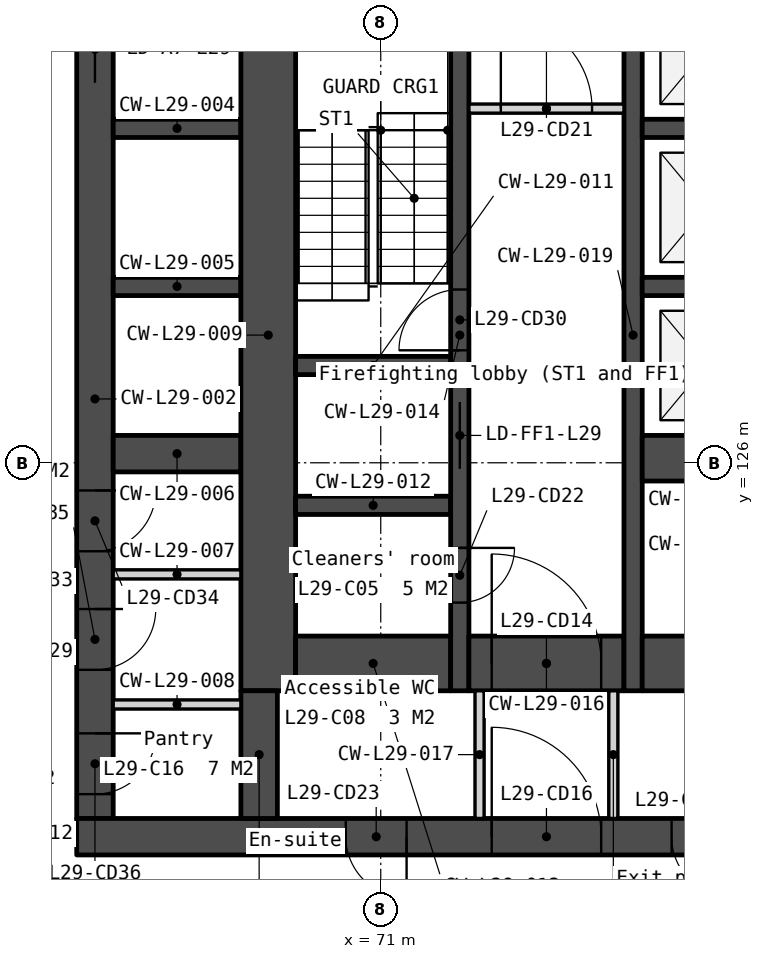
"""IFC4 building model, lengths in metres.
Left out: names, types, materials, properties, quantities, classifications, styles, units other than length and angle.
Written with IfcOpenShell. Run it as: python <this file> out.ifc"""

import sys

from ifc_helpers import new_model, si_unit, direction, frame, frame_2d, origin, place, context, subcontext, project, spatial, polyline, rectangle, outline, extrude, element, fill, save


model = new_model("IFC4")
c1 = context("Model", 3, precision=1e-05, world=origin(), true_north=direction((0.0, 1.0)))
c2 = subcontext(c1, "Body", "Model", "MODEL_VIEW")
j1 = project(units=[si_unit("LENGTHUNIT", "METRE"), si_unit("PLANEANGLEUNIT", "RADIAN")], contexts=[c1])
p1 = place(None, origin())
s1 = spatial("IfcSite", under=j1, at=p1, CompositionType="ELEMENT")
p2 = place(p1, origin())
s2 = spatial("IfcBuilding", under=s1, at=p2, CompositionType="ELEMENT")
p3 = place(p2, frame((0.0, 0.0, 116.8)))
s3 = spatial("IfcBuildingStorey", under=s2, at=p3, CompositionType="ELEMENT", Elevation=116.8)
p4 = place(p3, frame((66.3, 133.95, 0.0), z_axis=(0.0, 0.0, 1.0), x_axis=(0.0, -1.0, 0.0)))
e1 = element("IfcWall", 1, at=p4, inside=s3, PredefinedType="SOLIDWALL", context=c2, shape_type="SweptSolid", body=[
    extrude(rectangle(XDim=13.8, YDim=0.6, at=frame_2d((6.9, 0.0))), origin(), (0.0, 0.0, 1.0), 3.35),
])
p5 = place(p4, frame((0.6, 0.0, 0.0)))
e2 = element("IfcOpeningElement", 2, at=p5, cuts=e1, PredefinedType="OPENING", context=c2, shape_type="SweptSolid", body=[
    extrude(rectangle(XDim=1.1, YDim=2.1, at=frame_2d((0.55, 1.05))), frame((0.0, 0.31, 0.0), z_axis=(0.0, -1.0, 0.0), x_axis=(1.0, 0.0, 0.0)), (0.0, 0.0, 1.0), 0.62),
])
p6 = place(p4, frame((8.405, 0.0, 0.0)))
e3 = element("IfcOpeningElement", 3, at=p6, cuts=e1, PredefinedType="OPENING", context=c2, shape_type="SweptSolid", body=[
    extrude(rectangle(XDim=1.0, YDim=2.1, at=frame_2d((0.5, 1.05))), frame((0.0, 0.31, 0.0), z_axis=(0.0, -1.0, 0.0), x_axis=(1.0, 0.0, 0.0)), (0.0, 0.0, 1.0), 0.62),
])
p7 = place(p4, frame((10.355, 0.0, 0.0)))
e4 = element("IfcOpeningElement", 4, at=p7, cuts=e1, PredefinedType="OPENING", context=c2, shape_type="SweptSolid", body=[
    extrude(rectangle(XDim=1.0, YDim=2.1, at=frame_2d((0.5, 1.05))), frame((0.0, 0.31, 0.0), z_axis=(0.0, -1.0, 0.0), x_axis=(1.0, 0.0, 0.0)), (0.0, 0.0, 1.0), 0.62),
])
p8 = place(p4, frame((12.4, 0.0, 0.0)))
e5 = element("IfcOpeningElement", 5, at=p8, cuts=e1, PredefinedType="OPENING", context=c2, shape_type="SweptSolid", body=[
    extrude(rectangle(XDim=1.0, YDim=2.1, at=frame_2d((0.5, 1.05))), frame((0.0, 0.31, 0.0), z_axis=(0.0, -1.0, 0.0), x_axis=(1.0, 0.0, 0.0)), (0.0, 0.0, 1.0), 0.62),
])
p9 = place(p3, frame((66.0, 119.85, 0.0), z_axis=(0.0, 0.0, 1.0), x_axis=(1.0, 0.0, 0.0)))
e6 = element("IfcWall", 6, at=p9, inside=s3, PredefinedType="SOLIDWALL", context=c2, shape_type="SweptSolid", body=[
    extrude(rectangle(XDim=28.0, YDim=0.6, at=frame_2d((14.0, 0.0))), origin(), (0.0, 0.0, 1.0), 3.35),
])
p10 = place(p9, frame((6.825, 0.0, 0.0)))
e7 = element("IfcOpeningElement", 7, at=p10, cuts=e6, PredefinedType="OPENING", context=c2, shape_type="SweptSolid", body=[
    extrude(rectangle(XDim=1.8, YDim=2.1, at=frame_2d((0.9, 1.05))), frame((0.0, 0.31, 0.0), z_axis=(0.0, -1.0, 0.0), x_axis=(1.0, 0.0, 0.0)), (0.0, 0.0, 1.0), 0.62),
])
p11 = place(p9, frame((15.85, 0.0, 0.0)))
e8 = element("IfcOpeningElement", 8, at=p11, cuts=e6, PredefinedType="OPENING", context=c2, shape_type="SweptSolid", body=[
    extrude(rectangle(XDim=1.5, YDim=2.1, at=frame_2d((0.75, 1.05))), frame((0.0, 0.31, 0.0), z_axis=(0.0, -1.0, 0.0), x_axis=(1.0, 0.0, 0.0)), (0.0, 0.0, 1.0), 0.62),
])
p12 = place(p9, frame((19.375, 0.0, 0.0)))
e9 = element("IfcOpeningElement", 9, at=p12, cuts=e6, PredefinedType="OPENING", context=c2, shape_type="SweptSolid", body=[
    extrude(rectangle(XDim=1.8, YDim=2.1, at=frame_2d((0.9, 1.05))), frame((0.0, 0.31, 0.0), z_axis=(0.0, -1.0, 0.0), x_axis=(1.0, 0.0, 0.0)), (0.0, 0.0, 1.0), 0.62),
])
p13 = place(p9, frame((4.425, 0.0, 0.0)))
e10 = element("IfcOpeningElement", 10, at=p13, cuts=e6, PredefinedType="OPENING", context=c2, shape_type="SweptSolid", body=[
    extrude(rectangle(XDim=1.0, YDim=2.1, at=frame_2d((0.5, 1.05))), frame((0.0, 0.31, 0.0), z_axis=(0.0, -1.0, 0.0), x_axis=(1.0, 0.0, 0.0)), (0.0, 0.0, 1.0), 0.62),
])
p14 = place(p9, frame((9.783, 0.0, 0.0)))
e11 = element("IfcOpeningElement", 11, at=p14, cuts=e6, PredefinedType="OPENING", context=c2, shape_type="SweptSolid", body=[
    extrude(rectangle(XDim=1.0, YDim=2.1, at=frame_2d((0.5, 1.05))), frame((0.0, 0.31, 0.0), z_axis=(0.0, -1.0, 0.0), x_axis=(1.0, 0.0, 0.0)), (0.0, 0.0, 1.0), 0.62),
])
p15 = place(p9, frame((11.525, 0.0, 0.0)))
e12 = element("IfcOpeningElement", 12, at=p15, cuts=e6, PredefinedType="OPENING", context=c2, shape_type="SweptSolid", body=[
    extrude(rectangle(XDim=1.0, YDim=2.1, at=frame_2d((0.5, 1.05))), frame((0.0, 0.31, 0.0), z_axis=(0.0, -1.0, 0.0), x_axis=(1.0, 0.0, 0.0)), (0.0, 0.0, 1.0), 0.62),
])
p16 = place(p9, frame((13.658, 0.0, 0.0)))
e13 = element("IfcOpeningElement", 13, at=p16, cuts=e6, PredefinedType="OPENING", context=c2, shape_type="SweptSolid", body=[
    extrude(rectangle(XDim=1.0, YDim=2.1, at=frame_2d((0.5, 1.05))), frame((0.0, 0.31, 0.0), z_axis=(0.0, -1.0, 0.0), x_axis=(1.0, 0.0, 0.0)), (0.0, 0.0, 1.0), 0.62),
])
p17 = place(p9, frame((21.725, 0.0, 0.0)))
e14 = element("IfcOpeningElement", 14, at=p17, cuts=e6, PredefinedType="OPENING", context=c2, shape_type="SweptSolid", body=[
    extrude(rectangle(XDim=1.0, YDim=2.1, at=frame_2d((0.5, 1.05))), frame((0.0, 0.31, 0.0), z_axis=(0.0, -1.0, 0.0), x_axis=(1.0, 0.0, 0.0)), (0.0, 0.0, 1.0), 0.62),
])
p18 = place(p9, frame((23.425, 0.0, 0.0)))
e15 = element("IfcOpeningElement", 15, at=p18, cuts=e6, PredefinedType="OPENING", context=c2, shape_type="SweptSolid", body=[
    extrude(rectangle(XDim=1.0, YDim=2.1, at=frame_2d((0.5, 1.05))), frame((0.0, 0.31, 0.0), z_axis=(0.0, -1.0, 0.0), x_axis=(1.0, 0.0, 0.0)), (0.0, 0.0, 1.0), 0.62),
])
for number, where, z_axis, x_axis in (
    (16, (66.6, 131.5, 0.0), (0.0, 0.0, 1.0), (1.0, 0.0, 0.0)),
    (17, (66.6, 128.9, 0.0), (0.0, 0.0, 1.0), (1.0, 0.0, 0.0)),
):
    element("IfcWall", number, at=place(p3, frame(where, z_axis=z_axis, x_axis=x_axis)), inside=s3, PredefinedType="SOLIDWALL", context=c2, shape_type="SweptSolid", body=[
        extrude(rectangle(XDim=2.1, YDim=0.3, at=frame_2d((1.05, 0.0))), origin(), (0.0, 0.0, 1.0), 3.35),
    ])
p19 = place(p3, frame((66.6, 126.15, 0.0), z_axis=(0.0, 0.0, 1.0), x_axis=(1.0, 0.0, 0.0)))
e18 = element("IfcWall", 18, at=p19, inside=s3, PredefinedType="SOLIDWALL", context=c2, shape_type="SweptSolid", body=[
    extrude(rectangle(XDim=2.1, YDim=0.6, at=frame_2d((1.05, 0.0))), origin(), (0.0, 0.0, 1.0), 3.35),
])
for number, where, z_axis, x_axis in (
    (19, (66.6, 124.165, 0.0), (0.0, 0.0, 1.0), (1.0, 0.0, 0.0)),
    (20, (66.6, 122.025, 0.0), (0.0, 0.0, 1.0), (1.0, 0.0, 0.0)),
):
    element("IfcWall", number, at=place(p3, frame(where, z_axis=z_axis, x_axis=x_axis)), inside=s3, PredefinedType="PARTITIONING", context=c2, shape_type="SweptSolid", body=[
        extrude(rectangle(XDim=2.1, YDim=0.15, at=frame_2d((1.05, 0.0))), origin(), (0.0, 0.0, 1.0), 3.35),
    ])
p20 = place(p3, frame((69.15, 133.95, 0.0), z_axis=(0.0, 0.0, 1.0), x_axis=(0.0, -1.0, 0.0)))
e21 = element("IfcWall", 21, at=p20, inside=s3, PredefinedType="SOLIDWALL", context=c2, shape_type="SweptSolid", body=[
    extrude(rectangle(XDim=11.7, YDim=0.9, at=frame_2d((5.85, 0.0))), origin(), (0.0, 0.0, 1.0), 3.35),
])
p21 = place(p3, frame((69.0, 122.25, 0.0), z_axis=(0.0, 0.0, 1.0), x_axis=(0.0, -1.0, 0.0)))
e22 = element("IfcWall", 22, at=p21, inside=s3, PredefinedType="SOLIDWALL", context=c2, shape_type="SweptSolid", body=[
    extrude(rectangle(XDim=2.1, YDim=0.6, at=frame_2d((1.05, 0.0))), origin(), (0.0, 0.0, 1.0), 3.35),
])
for number, where, z_axis, x_axis in (
    (23, (69.6, 127.6, 0.0), (0.0, 0.0, 1.0), (1.0, 0.0, 0.0)),
    (24, (69.6, 125.3, 0.0), (0.0, 0.0, 1.0), (1.0, 0.0, 0.0)),
):
    element("IfcWall", number, at=place(p3, frame(where, z_axis=z_axis, x_axis=x_axis)), inside=s3, PredefinedType="SOLIDWALL", context=c2, shape_type="SweptSolid", body=[
        extrude(rectangle(XDim=2.55, YDim=0.3, at=frame_2d((1.275, 0.0))), origin(), (0.0, 0.0, 1.0), 3.35),
    ])
p22 = place(p3, frame((69.6, 122.7, 0.0), z_axis=(0.0, 0.0, 1.0), x_axis=(1.0, 0.0, 0.0)))
e25 = element("IfcWall", 25, at=p22, inside=s3, PredefinedType="SOLIDWALL", context=c2, shape_type="SweptSolid", body=[
    extrude(rectangle(XDim=2.55, YDim=0.9, at=frame_2d((1.275, 0.0))), origin(), (0.0, 0.0, 1.0), 3.35),
])
p23 = place(p3, frame((72.3, 133.95, 0.0), z_axis=(0.0, 0.0, 1.0), x_axis=(0.0, -1.0, 0.0)))
e26 = element("IfcWall", 26, at=p23, inside=s3, PredefinedType="SOLIDWALL", context=c2, shape_type="SweptSolid", body=[
    extrude(rectangle(XDim=11.7, YDim=0.3, at=frame_2d((5.85, 0.0))), origin(), (0.0, 0.0, 1.0), 3.35),
])
p24 = place(p23, frame((6.95, 0.0, 0.0)))
e27 = element("IfcOpeningElement", 27, at=p24, cuts=e26, PredefinedType="OPENING", context=c2, shape_type="SweptSolid", body=[
    extrude(rectangle(XDim=1.1, YDim=2.1, at=frame_2d((0.55, 1.05))), frame((0.0, 0.16, 0.0), z_axis=(0.0, -1.0, 0.0), x_axis=(1.0, 0.0, 0.0)), (0.0, 0.0, 1.0), 0.32),
])
p25 = place(p23, frame((9.35, 0.0, 0.0)))
e28 = element("IfcOpeningElement", 28, at=p25, cuts=e26, PredefinedType="OPENING", context=c2, shape_type="SweptSolid", body=[
    extrude(rectangle(XDim=0.9, YDim=2.1, at=frame_2d((0.45, 1.05))), frame((0.0, 0.16, 0.0), z_axis=(0.0, -1.0, 0.0), x_axis=(1.0, 0.0, 0.0)), (0.0, 0.0, 1.0), 0.32),
])
p26 = place(p23, frame((5.1, 0.0, 0.0)))
e29 = element("IfcOpeningElement", 29, at=p26, cuts=e26, PredefinedType="OPENING", context=c2, shape_type="SweptSolid", body=[
    extrude(rectangle(XDim=1.0, YDim=2.1, at=frame_2d((0.5, 1.05))), frame((0.0, 0.16, 0.0), z_axis=(0.0, -1.0, 0.0), x_axis=(1.0, 0.0, 0.0)), (0.0, 0.0, 1.0), 0.32),
])
p27 = place(p3, frame((72.45, 131.825, 0.0), z_axis=(0.0, 0.0, 1.0), x_axis=(1.0, 0.0, 0.0)))
e30 = element("IfcWall", 30, at=p27, inside=s3, PredefinedType="PARTITIONING", context=c2, shape_type="SweptSolid", body=[
    extrude(rectangle(XDim=2.55, YDim=0.15, at=frame_2d((1.275, 0.0))), origin(), (0.0, 0.0, 1.0), 3.35),
])
p28 = place(p27, frame((0.525, 0.0, 0.0)))
e31 = element("IfcOpeningElement", 31, at=p28, cuts=e30, PredefinedType="OPENING", context=c2, shape_type="SweptSolid", body=[
    extrude(rectangle(XDim=1.5, YDim=2.1, at=frame_2d((0.75, 1.05))), frame((0.0, 0.085, 0.0), z_axis=(0.0, -1.0, 0.0), x_axis=(1.0, 0.0, 0.0)), (0.0, 0.0, 1.0), 0.17),
])
p29 = place(p3, frame((72.45, 122.7, 0.0), z_axis=(0.0, 0.0, 1.0), x_axis=(1.0, 0.0, 0.0)))
e32 = element("IfcWall", 32, at=p29, inside=s3, PredefinedType="SOLIDWALL", context=c2, shape_type="SweptSolid", body=[
    extrude(rectangle(XDim=2.55, YDim=0.9, at=frame_2d((1.275, 0.0))), origin(), (0.0, 0.0, 1.0), 3.35),
])
p30 = place(p29, frame((0.375, 0.0, 0.0)))
e33 = element("IfcOpeningElement", 33, at=p30, cuts=e32, PredefinedType="OPENING", context=c2, shape_type="SweptSolid", body=[
    extrude(rectangle(XDim=1.8, YDim=2.1, at=frame_2d((0.9, 1.05))), frame((0.0, 0.46, 0.0), z_axis=(0.0, -1.0, 0.0), x_axis=(1.0, 0.0, 0.0)), (0.0, 0.0, 1.0), 0.92),
])
for number, where, z_axis, x_axis in (
    (34, (72.625, 122.25, 0.0), (0.0, 0.0, 1.0), (0.0, -1.0, 0.0)),
    (35, (74.825, 122.25, 0.0), (0.0, 0.0, 1.0), (0.0, -1.0, 0.0)),
):
    element("IfcWall", number, at=place(p3, frame(where, z_axis=z_axis, x_axis=x_axis)), inside=s3, PredefinedType="PARTITIONING", context=c2, shape_type="SweptSolid", body=[
        extrude(rectangle(XDim=2.1, YDim=0.15, at=frame_2d((1.05, 0.0))), origin(), (0.0, 0.0, 1.0), 3.35),
    ])
p31 = place(p3, frame((75.15, 133.95, 0.0), z_axis=(0.0, 0.0, 1.0), x_axis=(0.0, -1.0, 0.0)))
e36 = element("IfcWall", 36, at=p31, inside=s3, PredefinedType="SOLIDWALL", context=c2, shape_type="SweptSolid", body=[
    extrude(rectangle(XDim=11.7, YDim=0.3, at=frame_2d((5.85, 0.0))), origin(), (0.0, 0.0, 1.0), 3.35),
])
for number, where, z_axis, x_axis in (
    (37, (75.3, 131.5, 0.0), (0.0, 0.0, 1.0), (1.0, 0.0, 0.0)),
    (38, (75.3, 128.9, 0.0), (0.0, 0.0, 1.0), (1.0, 0.0, 0.0)),
):
    element("IfcWall", number, at=place(p3, frame(where, z_axis=z_axis, x_axis=x_axis)), inside=s3, PredefinedType="SOLIDWALL", context=c2, shape_type="SweptSolid", body=[
        extrude(rectangle(XDim=2.1, YDim=0.3, at=frame_2d((1.05, 0.0))), origin(), (0.0, 0.0, 1.0), 3.35),
    ])
p32 = place(p3, frame((75.3, 126.075, 0.0), z_axis=(0.0, 0.0, 1.0), x_axis=(1.0, 0.0, 0.0)))
e39 = element("IfcWall", 39, at=p32, inside=s3, PredefinedType="SOLIDWALL", context=c2, shape_type="SweptSolid", body=[
    extrude(rectangle(XDim=2.1, YDim=0.75, at=frame_2d((1.05, 0.0))), origin(), (0.0, 0.0, 1.0), 3.35),
])
p33 = place(p3, frame((75.3, 122.7, 0.0), z_axis=(0.0, 0.0, 1.0), x_axis=(1.0, 0.0, 0.0)))
e40 = element("IfcWall", 40, at=p33, inside=s3, PredefinedType="SOLIDWALL", context=c2, shape_type="SweptSolid", body=[
    extrude(rectangle(XDim=6.2, YDim=0.9, at=frame_2d((3.1, 0.0))), origin(), (0.0, 0.0, 1.0), 3.35),
])
p34 = place(p3, frame((56.073, 130.263, -0.15), z_axis=(0.0, 0.0, 1.0), x_axis=(0.500000478905, -0.866025127289, 0.0)))
e41 = element("IfcWall", 41, at=p34, inside=s3, PredefinedType="SOLIDWALL", context=c2, shape_type="SweptSolid", body=[
    extrude(outline(polyline([(42.643, 0.0), (42.643, 3.5), (0.0, 3.5), (0.0, 0.0), (42.643, 0.0)])), frame((0.0, 0.225, 0.0), z_axis=(0.0, -1.0, 0.0), x_axis=(1.0, 0.0, 0.0)), (0.0, 0.0, 1.0), 0.45),
])
p35 = place(p34, frame((0.72, 0.0, 1.05)))
e42 = element("IfcOpeningElement", 42, at=p35, cuts=e41, PredefinedType="OPENING", context=c2, shape_type="SweptSolid", body=[
    extrude(rectangle(XDim=1.2, YDim=1.5, at=frame_2d((0.6, 0.75))), frame((0.0, 0.235, 0.0), z_axis=(0.0, -1.0, 0.0), x_axis=(1.0, 0.0, 0.0)), (0.0, 0.0, 1.0), 0.47),
])
p36 = place(p34, frame((7.079, 0.0, 1.05)))
e43 = element("IfcOpeningElement", 43, at=p36, cuts=e41, PredefinedType="OPENING", context=c2, shape_type="SweptSolid", body=[
    extrude(rectangle(XDim=1.2, YDim=1.5, at=frame_2d((0.6, 0.75))), frame((0.0, 0.235, 0.0), z_axis=(0.0, -1.0, 0.0), x_axis=(1.0, 0.0, 0.0)), (0.0, 0.0, 1.0), 0.47),
])
p37 = place(p34, frame((8.779, 0.0, 1.05)))
e44 = element("IfcOpeningElement", 44, at=p37, cuts=e41, PredefinedType="OPENING", context=c2, shape_type="SweptSolid", body=[
    extrude(rectangle(XDim=1.2, YDim=1.5, at=frame_2d((0.6, 0.75))), frame((0.0, 0.235, 0.0), z_axis=(0.0, -1.0, 0.0), x_axis=(1.0, 0.0, 0.0)), (0.0, 0.0, 1.0), 0.47),
])
p38 = place(p34, frame((15.607, 0.0, 1.05)))
e45 = element("IfcOpeningElement", 45, at=p38, cuts=e41, PredefinedType="OPENING", context=c2, shape_type="SweptSolid", body=[
    extrude(rectangle(XDim=1.2, YDim=1.5, at=frame_2d((0.6, 0.75))), frame((0.0, 0.235, 0.0), z_axis=(0.0, -1.0, 0.0), x_axis=(1.0, 0.0, 0.0)), (0.0, 0.0, 1.0), 0.47),
])
p39 = place(p34, frame((17.307, 0.0, 1.05)))
e46 = element("IfcOpeningElement", 46, at=p39, cuts=e41, PredefinedType="OPENING", context=c2, shape_type="SweptSolid", body=[
    extrude(rectangle(XDim=1.2, YDim=1.5, at=frame_2d((0.6, 0.75))), frame((0.0, 0.235, 0.0), z_axis=(0.0, -1.0, 0.0), x_axis=(1.0, 0.0, 0.0)), (0.0, 0.0, 1.0), 0.47),
])
p40 = place(p34, frame((24.136, 0.0, 1.05)))
e47 = element("IfcOpeningElement", 47, at=p40, cuts=e41, PredefinedType="OPENING", context=c2, shape_type="SweptSolid", body=[
    extrude(rectangle(XDim=1.2, YDim=1.5, at=frame_2d((0.6, 0.75))), frame((0.0, 0.235, 0.0), z_axis=(0.0, -1.0, 0.0), x_axis=(1.0, 0.0, 0.0)), (0.0, 0.0, 1.0), 0.47),
])
p41 = place(p34, frame((25.836, 0.0, 1.05)))
e48 = element("IfcOpeningElement", 48, at=p41, cuts=e41, PredefinedType="OPENING", context=c2, shape_type="SweptSolid", body=[
    extrude(rectangle(XDim=1.2, YDim=1.5, at=frame_2d((0.6, 0.75))), frame((0.0, 0.235, 0.0), z_axis=(0.0, -1.0, 0.0), x_axis=(1.0, 0.0, 0.0)), (0.0, 0.0, 1.0), 0.47),
])
p42 = place(p34, frame((32.665, 0.0, 1.05)))
e49 = element("IfcOpeningElement", 49, at=p42, cuts=e41, PredefinedType="OPENING", context=c2, shape_type="SweptSolid", body=[
    extrude(rectangle(XDim=1.2, YDim=1.5, at=frame_2d((0.6, 0.75))), frame((0.0, 0.235, 0.0), z_axis=(0.0, -1.0, 0.0), x_axis=(1.0, 0.0, 0.0)), (0.0, 0.0, 1.0), 0.47),
])
p43 = place(p34, frame((34.365, 0.0, 1.05)))
e50 = element("IfcOpeningElement", 50, at=p43, cuts=e41, PredefinedType="OPENING", context=c2, shape_type="SweptSolid", body=[
    extrude(rectangle(XDim=1.2, YDim=1.5, at=frame_2d((0.6, 0.75))), frame((0.0, 0.235, 0.0), z_axis=(0.0, -1.0, 0.0), x_axis=(1.0, 0.0, 0.0)), (0.0, 0.0, 1.0), 0.47),
])
p44 = place(p34, frame((40.722, 0.0, 1.05)))
e51 = element("IfcOpeningElement", 51, at=p44, cuts=e41, PredefinedType="OPENING", context=c2, shape_type="SweptSolid", body=[
    extrude(rectangle(XDim=1.2, YDim=1.5, at=frame_2d((0.6, 0.75))), frame((0.0, 0.235, 0.0), z_axis=(0.0, -1.0, 0.0), x_axis=(1.0, 0.0, 0.0)), (0.0, 0.0, 1.0), 0.47),
])
p45 = place(p5, origin())
e52 = element("IfcDoor", 52, at=p45, inside=s3, OperationType="SLIDING_TO_LEFT", PredefinedType="DOOR", context=c2, shape_type="SweptSolid", body=[
    extrude(rectangle(XDim=1.1, YDim=2.1, at=frame_2d((0.55, 1.05))), frame((0.0, 0.025, 0.0), z_axis=(0.0, -1.0, 0.0), x_axis=(1.0, 0.0, 0.0)), (0.0, 0.0, 1.0), 0.05),
])
fill(e2, e52)
p46 = place(p24, origin())
e53 = element("IfcDoor", 53, at=p46, inside=s3, OperationType="SLIDING_TO_LEFT", PredefinedType="DOOR", context=c2, shape_type="SweptSolid", body=[
    extrude(rectangle(XDim=1.1, YDim=2.1, at=frame_2d((0.55, 1.05))), frame((0.0, 0.025, 0.0), z_axis=(0.0, -1.0, 0.0), x_axis=(1.0, 0.0, 0.0)), (0.0, 0.0, 1.0), 0.05),
])
fill(e27, e53)
p47 = place(p30, origin())
e54 = element("IfcDoor", 54, at=p47, inside=s3, OperationType="DOUBLE_DOOR_DOUBLE_SWING", PredefinedType="DOOR", context=c2, shape_type="SweptSolid", body=[
    extrude(rectangle(XDim=1.8, YDim=2.1, at=frame_2d((0.9, 1.05))), frame((0.0, 0.025, 0.0), z_axis=(0.0, -1.0, 0.0), x_axis=(1.0, 0.0, 0.0)), (0.0, 0.0, 1.0), 0.05),
])
fill(e33, e54)
p48 = place(p10, origin())
e55 = element("IfcDoor", 55, at=p48, inside=s3, OperationType="DOUBLE_DOOR_DOUBLE_SWING", PredefinedType="DOOR", context=c2, shape_type="SweptSolid", body=[
    extrude(rectangle(XDim=1.8, YDim=2.1, at=frame_2d((0.9, 1.05))), frame((0.0, 0.025, 0.0), z_axis=(0.0, -1.0, 0.0), x_axis=(1.0, 0.0, 0.0)), (0.0, 0.0, 1.0), 0.05),
])
fill(e7, e55)
p49 = place(p28, origin())
e56 = element("IfcDoor", 56, at=p49, inside=s3, OperationType="DOUBLE_DOOR_DOUBLE_SWING", PredefinedType="DOOR", context=c2, shape_type="SweptSolid", body=[
    extrude(rectangle(XDim=1.5, YDim=2.1, at=frame_2d((0.75, 1.05))), frame((0.0, 0.025, 0.0), z_axis=(0.0, -1.0, 0.0), x_axis=(1.0, 0.0, 0.0)), (0.0, 0.0, 1.0), 0.05),
])
fill(e31, e56)
p50 = place(p25, origin())
e57 = element("IfcDoor", 57, at=p50, inside=s3, OperationType="SINGLE_SWING_LEFT", PredefinedType="DOOR", context=c2, shape_type="SweptSolid", body=[
    extrude(rectangle(XDim=0.9, YDim=2.1, at=frame_2d((0.45, 1.05))), frame((0.0, 0.025, 0.0), z_axis=(0.0, -1.0, 0.0), x_axis=(1.0, 0.0, 0.0)), (0.0, 0.0, 1.0), 0.05),
])
fill(e28, e57)
p51 = place(p13, origin())
e58 = element("IfcDoor", 58, at=p51, inside=s3, OperationType="SINGLE_SWING_RIGHT", PredefinedType="DOOR", context=c2, shape_type="SweptSolid", body=[
    extrude(rectangle(XDim=1.0, YDim=2.1, at=frame_2d((0.5, 1.05))), frame((0.0, 0.025, 0.0), z_axis=(0.0, -1.0, 0.0), x_axis=(1.0, 0.0, 0.0)), (0.0, 0.0, 1.0), 0.05),
])
fill(e10, e58)
p52 = place(p14, origin())
e59 = element("IfcDoor", 59, at=p52, inside=s3, OperationType="SINGLE_SWING_RIGHT", PredefinedType="DOOR", context=c2, shape_type="SweptSolid", body=[
    extrude(rectangle(XDim=1.0, YDim=2.1, at=frame_2d((0.5, 1.05))), frame((0.0, 0.025, 0.0), z_axis=(0.0, -1.0, 0.0), x_axis=(1.0, 0.0, 0.0)), (0.0, 0.0, 1.0), 0.05),
])
fill(e11, e59)
p53 = place(p26, origin())
e60 = element("IfcDoor", 60, at=p53, inside=s3, OperationType="SINGLE_SWING_RIGHT", PredefinedType="DOOR", context=c2, shape_type="SweptSolid", body=[
    extrude(rectangle(XDim=1.0, YDim=2.1, at=frame_2d((0.5, 1.05))), frame((0.0, 0.025, 0.0), z_axis=(0.0, -1.0, 0.0), x_axis=(1.0, 0.0, 0.0)), (0.0, 0.0, 1.0), 0.05),
])
fill(e29, e60)
p54 = place(p6, origin())
e61 = element("IfcDoor", 61, at=p54, inside=s3, OperationType="SINGLE_SWING_LEFT", PredefinedType="DOOR", context=c2, shape_type="SweptSolid", body=[
    extrude(rectangle(XDim=1.0, YDim=2.1, at=frame_2d((0.5, 1.05))), frame((0.0, 0.025, 0.0), z_axis=(0.0, -1.0, 0.0), x_axis=(1.0, 0.0, 0.0)), (0.0, 0.0, 1.0), 0.05),
])
fill(e3, e61)
p55 = place(p7, origin())
e62 = element("IfcDoor", 62, at=p55, inside=s3, OperationType="SINGLE_SWING_LEFT", PredefinedType="DOOR", context=c2, shape_type="SweptSolid", body=[
    extrude(rectangle(XDim=1.0, YDim=2.1, at=frame_2d((0.5, 1.05))), frame((0.0, 0.025, 0.0), z_axis=(0.0, -1.0, 0.0), x_axis=(1.0, 0.0, 0.0)), (0.0, 0.0, 1.0), 0.05),
])
fill(e4, e62)
p56 = place(p8, origin())
e63 = element("IfcDoor", 63, at=p56, inside=s3, OperationType="SINGLE_SWING_LEFT", PredefinedType="DOOR", context=c2, shape_type="SweptSolid", body=[
    extrude(rectangle(XDim=1.0, YDim=2.1, at=frame_2d((0.5, 1.05))), frame((0.0, 0.025, 0.0), z_axis=(0.0, -1.0, 0.0), x_axis=(1.0, 0.0, 0.0)), (0.0, 0.0, 1.0), 0.05),
])
fill(e5, e63)
save(model, sys.argv[1])
